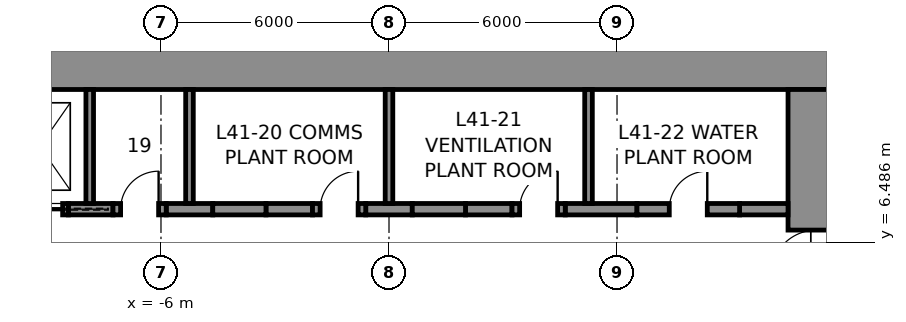
"""IFC4 building model, lengths in metres.
Left out: names, types, materials, properties, quantities, classifications, styles, units other than length and angle.
Written with IfcOpenShell. Run it as: python <this file> out.ifc"""

import sys

from ifc_helpers import new_model, si_unit, direction, frame, frame_2d, origin, place, context, subcontext, project, spatial, rectangle, extrude, element, fill, save


model = new_model("IFC4")
c1 = context("Model", 3, precision=1e-05, world=origin(), true_north=direction((0.0, 1.0)))
c2 = subcontext(c1, "Body", "Model", "MODEL_VIEW")
j1 = project(units=[si_unit("LENGTHUNIT", "METRE"), si_unit("PLANEANGLEUNIT", "RADIAN")], contexts=[c1])
p1 = place(None, origin())
s1 = spatial("IfcSite", under=j1, at=p1, CompositionType="ELEMENT")
p2 = place(p1, origin())
s2 = spatial("IfcBuilding", under=s1, at=p2, CompositionType="ELEMENT")
p3 = place(p2, frame((0.0, 0.0, 191.8)))
s3 = spatial("IfcBuildingStorey", under=s2, at=p3, CompositionType="ELEMENT", Elevation=191.8)
p4 = place(p3, frame((-12.0, 11.25, 0.0), z_axis=(0.0, 0.0, 1.0), x_axis=(1.0, 0.0, 0.0)))
e1 = element("IfcWall", 1, at=p4, inside=s3, PredefinedType="SHEAR", context=c2, shape_type="SweptSolid", body=[
    extrude(rectangle(XDim=24.0, YDim=1.5, at=frame_2d((12.0, 0.0))), origin(), (0.0, 0.0, 1.0), 5.0),
])
p5 = place(p3, frame((11.25, 10.5, 0.0), z_axis=(0.0, 0.0, 1.0), x_axis=(0.0, -1.0, 0.0)))
e2 = element("IfcWall", 2, at=p5, inside=s3, PredefinedType="SHEAR", context=c2, shape_type="SweptSolid", body=[
    extrude(rectangle(XDim=21.0, YDim=1.5, at=frame_2d((10.5, 0.0))), origin(), (0.0, 0.0, 1.0), 5.0),
])
p6 = place(p5, frame((3.7, 0.0, 0.0)))
e3 = element("IfcOpeningElement", 3, at=p6, cuts=e2, PredefinedType="OPENING", context=c2, shape_type="SweptSolid", body=[
    extrude(rectangle(XDim=1.2, YDim=2.3, at=frame_2d((0.6, 1.15))), frame((0.0, 0.76, 0.0), z_axis=(0.0, -1.0, 0.0), x_axis=(1.0, 0.0, 0.0)), (0.0, 0.0, 1.0), 1.52),
])
p7 = place(p5, frame((16.1, 0.0, 0.0)))
e4 = element("IfcOpeningElement", 4, at=p7, cuts=e2, PredefinedType="OPENING", context=c2, shape_type="SweptSolid", body=[
    extrude(rectangle(XDim=1.2, YDim=2.3, at=frame_2d((0.6, 1.15))), frame((0.0, 0.76, 0.0), z_axis=(0.0, -1.0, 0.0), x_axis=(1.0, 0.0, 0.0)), (0.0, 0.0, 1.0), 1.52),
])
p8 = place(p3, frame((-8.438, 7.35, 0.0), z_axis=(0.0, 0.0, 1.0), x_axis=(1.0, 0.0, 0.0)))
e5 = element("IfcWall", 5, at=p8, inside=s3, PredefinedType="SHEAR", context=c2, shape_type="SweptSolid", body=[
    extrude(rectangle(XDim=1.175, YDim=0.3, at=frame_2d((0.587, 0.0))), origin(), (0.0, 0.0, 1.0), 5.0),
])
for number, where, z_axis, x_axis in (
    (6, (-5.863, 7.35, 0.0), (0.0, 0.0, 1.0), (1.0, 0.0, 0.0)),
    (7, (-3.238, 7.35, 0.0), (0.0, 0.0, 1.0), (1.0, 0.0, 0.0)),
    (8, (-0.613, 7.35, 0.0), (0.0, 0.0, 1.0), (1.0, 0.0, 0.0)),
    (9, (2.012, 7.35, 0.0), (0.0, 0.0, 1.0), (1.0, 0.0, 0.0)),
):
    element("IfcWall", number, at=place(p3, frame(where, z_axis=z_axis, x_axis=x_axis)), inside=s3, PredefinedType="SHEAR", context=c2, shape_type="SweptSolid", body=[
        extrude(rectangle(XDim=1.225, YDim=0.3, at=frame_2d((0.613, 0.0))), origin(), (0.0, 0.0, 1.0), 5.0),
    ])
p9 = place(p3, frame((4.637, 7.35, 0.0), z_axis=(0.0, 0.0, 1.0), x_axis=(1.0, 0.0, 0.0)))
e10 = element("IfcWall", 10, at=p9, inside=s3, PredefinedType="SHEAR", context=c2, shape_type="SweptSolid", body=[
    extrude(rectangle(XDim=1.887, YDim=0.3, at=frame_2d((0.944, 0.0))), origin(), (0.0, 0.0, 1.0), 5.0),
])
p10 = place(p3, frame((9.225, 7.35, 0.0), z_axis=(0.0, 0.0, 1.0), x_axis=(1.0, 0.0, 0.0)))
e11 = element("IfcWall", 11, at=p10, inside=s3, PredefinedType="SHEAR", context=c2, shape_type="SweptSolid", body=[
    extrude(rectangle(XDim=1.275, YDim=0.3, at=frame_2d((0.637, 0.0))), origin(), (0.0, 0.0, 1.0), 5.0),
])
p11 = place(p3, frame((-9.938, 7.35, 0.0), z_axis=(0.0, 0.0, 1.0), x_axis=(1.0, 0.0, 0.0)))
e12 = element("IfcWall", 12, at=p11, inside=s3, PredefinedType="PARTITIONING", context=c2, shape_type="SweptSolid", body=[
    extrude(rectangle(XDim=1.5, YDim=0.3, at=frame_2d((0.75, 0.0))), origin(), (0.0, 0.0, 1.0), 5.0),
])
p12 = place(p11, frame((0.15, 0.0, 0.0)))
e13 = element("IfcOpeningElement", 13, at=p12, cuts=e12, PredefinedType="OPENING", context=c2, shape_type="SweptSolid", body=[
    extrude(rectangle(XDim=1.2, YDim=2.3, at=frame_2d((0.6, 1.15))), frame((0.0, 0.16, 0.0), z_axis=(0.0, -1.0, 0.0), x_axis=(1.0, 0.0, 0.0)), (0.0, 0.0, 1.0), 0.32),
])
p13 = place(p3, frame((-7.262, 7.35, 0.0), z_axis=(0.0, 0.0, 1.0), x_axis=(1.0, 0.0, 0.0)))
e14 = element("IfcWall", 14, at=p13, inside=s3, PredefinedType="PARTITIONING", context=c2, shape_type="SweptSolid", body=[
    extrude(rectangle(XDim=1.4, YDim=0.3, at=frame_2d((0.7, 0.0))), origin(), (0.0, 0.0, 1.0), 5.0),
])
p14 = place(p13, frame((0.2, 0.0, 0.0)))
e15 = element("IfcOpeningElement", 15, at=p14, cuts=e14, PredefinedType="OPENING", context=c2, shape_type="SweptSolid", body=[
    extrude(rectangle(XDim=1.0, YDim=2.3, at=frame_2d((0.5, 1.15))), frame((0.0, 0.16, 0.0), z_axis=(0.0, -1.0, 0.0), x_axis=(1.0, 0.0, 0.0)), (0.0, 0.0, 1.0), 0.32),
])
p15 = place(p3, frame((-4.637, 7.35, 0.0), z_axis=(0.0, 0.0, 1.0), x_axis=(1.0, 0.0, 0.0)))
e16 = element("IfcWall", 16, at=p15, inside=s3, PredefinedType="PARTITIONING", context=c2, shape_type="SweptSolid", body=[
    extrude(rectangle(XDim=1.4, YDim=0.3, at=frame_2d((0.7, 0.0))), origin(), (0.0, 0.0, 1.0), 5.0),
])
p16 = place(p3, frame((-2.012, 7.35, 0.0), z_axis=(0.0, 0.0, 1.0), x_axis=(1.0, 0.0, 0.0)))
e17 = element("IfcWall", 17, at=p16, inside=s3, PredefinedType="PARTITIONING", context=c2, shape_type="SweptSolid", body=[
    extrude(rectangle(XDim=1.4, YDim=0.3, at=frame_2d((0.7, 0.0))), origin(), (0.0, 0.0, 1.0), 5.0),
])
p17 = place(p16, frame((0.2, 0.0, 0.0)))
e18 = element("IfcOpeningElement", 18, at=p17, cuts=e17, PredefinedType="OPENING", context=c2, shape_type="SweptSolid", body=[
    extrude(rectangle(XDim=1.0, YDim=2.3, at=frame_2d((0.5, 1.15))), frame((0.0, 0.16, 0.0), z_axis=(0.0, -1.0, 0.0), x_axis=(1.0, 0.0, 0.0)), (0.0, 0.0, 1.0), 0.32),
])
p18 = place(p3, frame((0.613, 7.35, 0.0), z_axis=(0.0, 0.0, 1.0), x_axis=(1.0, 0.0, 0.0)))
e19 = element("IfcWall", 19, at=p18, inside=s3, PredefinedType="PARTITIONING", context=c2, shape_type="SweptSolid", body=[
    extrude(rectangle(XDim=1.4, YDim=0.3, at=frame_2d((0.7, 0.0))), origin(), (0.0, 0.0, 1.0), 5.0),
])
p19 = place(p3, frame((3.238, 7.35, 0.0), z_axis=(0.0, 0.0, 1.0), x_axis=(1.0, 0.0, 0.0)))
e20 = element("IfcWall", 20, at=p19, inside=s3, PredefinedType="PARTITIONING", context=c2, shape_type="SweptSolid", body=[
    extrude(rectangle(XDim=1.4, YDim=0.3, at=frame_2d((0.7, 0.0))), origin(), (0.0, 0.0, 1.0), 5.0),
])
p20 = place(p19, frame((0.2, 0.0, 0.0)))
e21 = element("IfcOpeningElement", 21, at=p20, cuts=e20, PredefinedType="OPENING", context=c2, shape_type="SweptSolid", body=[
    extrude(rectangle(XDim=1.0, YDim=2.3, at=frame_2d((0.5, 1.15))), frame((0.0, 0.16, 0.0), z_axis=(0.0, -1.0, 0.0), x_axis=(1.0, 0.0, 0.0)), (0.0, 0.0, 1.0), 0.32),
])
p21 = place(p3, frame((6.525, 7.35, 0.0), z_axis=(0.0, 0.0, 1.0), x_axis=(1.0, 0.0, 0.0)))
e22 = element("IfcWall", 22, at=p21, inside=s3, PredefinedType="PARTITIONING", context=c2, shape_type="SweptSolid", body=[
    extrude(rectangle(XDim=2.7, YDim=0.3, at=frame_2d((1.35, 0.0))), origin(), (0.0, 0.0, 1.0), 5.0),
])
p22 = place(p21, frame((0.85, 0.0, 0.0)))
e23 = element("IfcOpeningElement", 23, at=p22, cuts=e22, PredefinedType="OPENING", context=c2, shape_type="SweptSolid", body=[
    extrude(rectangle(XDim=1.0, YDim=2.3, at=frame_2d((0.5, 1.15))), frame((0.0, 0.16, 0.0), z_axis=(0.0, -1.0, 0.0), x_axis=(1.0, 0.0, 0.0)), (0.0, 0.0, 1.0), 0.32),
])
for number, where, z_axis, x_axis in (
    (24, (-7.875, 7.5, 0.0), (0.0, 0.0, 1.0), (0.0, 1.0, 0.0)),
    (25, (-5.25, 7.5, 0.0), (0.0, 0.0, 1.0), (0.0, 1.0, 0.0)),
    (26, (0.0, 7.5, 0.0), (0.0, 0.0, 1.0), (0.0, 1.0, 0.0)),
    (27, (5.25, 7.5, 0.0), (0.0, 0.0, 1.0), (0.0, 1.0, 0.0)),
):
    element("IfcWall", number, at=place(p3, frame(where, z_axis=z_axis, x_axis=x_axis)), inside=s3, PredefinedType="PARTITIONING", context=c2, shape_type="SweptSolid", body=[
        extrude(rectangle(XDim=3.0, YDim=0.2, at=frame_2d((1.5, 0.0))), origin(), (0.0, 0.0, 1.0), 5.0),
    ])
p23 = place(p14, origin())
e28 = element("IfcDoor", 28, at=p23, inside=s3, OperationType="SINGLE_SWING_RIGHT", PredefinedType="DOOR", context=c2, shape_type="SweptSolid", body=[
    extrude(rectangle(XDim=1.0, YDim=2.3, at=frame_2d((0.5, 1.15))), frame((0.0, 0.025, 0.0), z_axis=(0.0, -1.0, 0.0), x_axis=(1.0, 0.0, 0.0)), (0.0, 0.0, 1.0), 0.05),
])
fill(e15, e28)
p24 = place(p17, origin())
e29 = element("IfcDoor", 29, at=p24, inside=s3, OperationType="SINGLE_SWING_RIGHT", PredefinedType="DOOR", context=c2, shape_type="SweptSolid", body=[
    extrude(rectangle(XDim=1.0, YDim=2.3, at=frame_2d((0.5, 1.15))), frame((0.0, 0.025, 0.0), z_axis=(0.0, -1.0, 0.0), x_axis=(1.0, 0.0, 0.0)), (0.0, 0.0, 1.0), 0.05),
])
fill(e18, e29)
p25 = place(p20, origin())
e30 = element("IfcDoor", 30, at=p25, inside=s3, OperationType="SINGLE_SWING_RIGHT", PredefinedType="DOOR", context=c2, shape_type="SweptSolid", body=[
    extrude(rectangle(XDim=1.0, YDim=2.3, at=frame_2d((0.5, 1.15))), frame((0.0, 0.025, 0.0), z_axis=(0.0, -1.0, 0.0), x_axis=(1.0, 0.0, 0.0)), (0.0, 0.0, 1.0), 0.05),
])
fill(e21, e30)
p26 = place(p22, origin())
e31 = element("IfcDoor", 31, at=p26, inside=s3, OperationType="SINGLE_SWING_RIGHT", PredefinedType="DOOR", context=c2, shape_type="SweptSolid", body=[
    extrude(rectangle(XDim=1.0, YDim=2.3, at=frame_2d((0.5, 1.15))), frame((0.0, 0.025, 0.0), z_axis=(0.0, -1.0, 0.0), x_axis=(1.0, 0.0, 0.0)), (0.0, 0.0, 1.0), 0.05),
])
fill(e23, e31)
p27 = place(p6, frame((1.2, 0.0, 0.0), z_axis=(0.0, 0.0, 1.0), x_axis=(-1.0, 0.0, 0.0)))
e32 = element("IfcDoor", 32, at=p27, inside=s3, OperationType="SINGLE_SWING_LEFT", PredefinedType="DOOR", context=c2, shape_type="SweptSolid", body=[
    extrude(rectangle(XDim=1.2, YDim=2.3, at=frame_2d((0.6, 1.15))), frame((0.0, 0.025, 0.0), z_axis=(0.0, -1.0, 0.0), x_axis=(1.0, 0.0, 0.0)), (0.0, 0.0, 1.0), 0.05),
])
fill(e3, e32)
p28 = place(p12, frame((1.2, 0.0, 0.0), z_axis=(0.0, 0.0, 1.0), x_axis=(-1.0, 0.0, 0.0)))
e33 = element("IfcDoor", 33, at=p28, inside=s3, OperationType="SLIDING_TO_LEFT", PredefinedType="DOOR", context=c2, shape_type="SweptSolid", body=[
    extrude(rectangle(XDim=1.2, YDim=2.3, at=frame_2d((0.6, 1.15))), frame((0.0, 0.025, 0.0), z_axis=(0.0, -1.0, 0.0), x_axis=(1.0, 0.0, 0.0)), (0.0, 0.0, 1.0), 0.05),
])
fill(e13, e33)
save(model, sys.argv[1])
